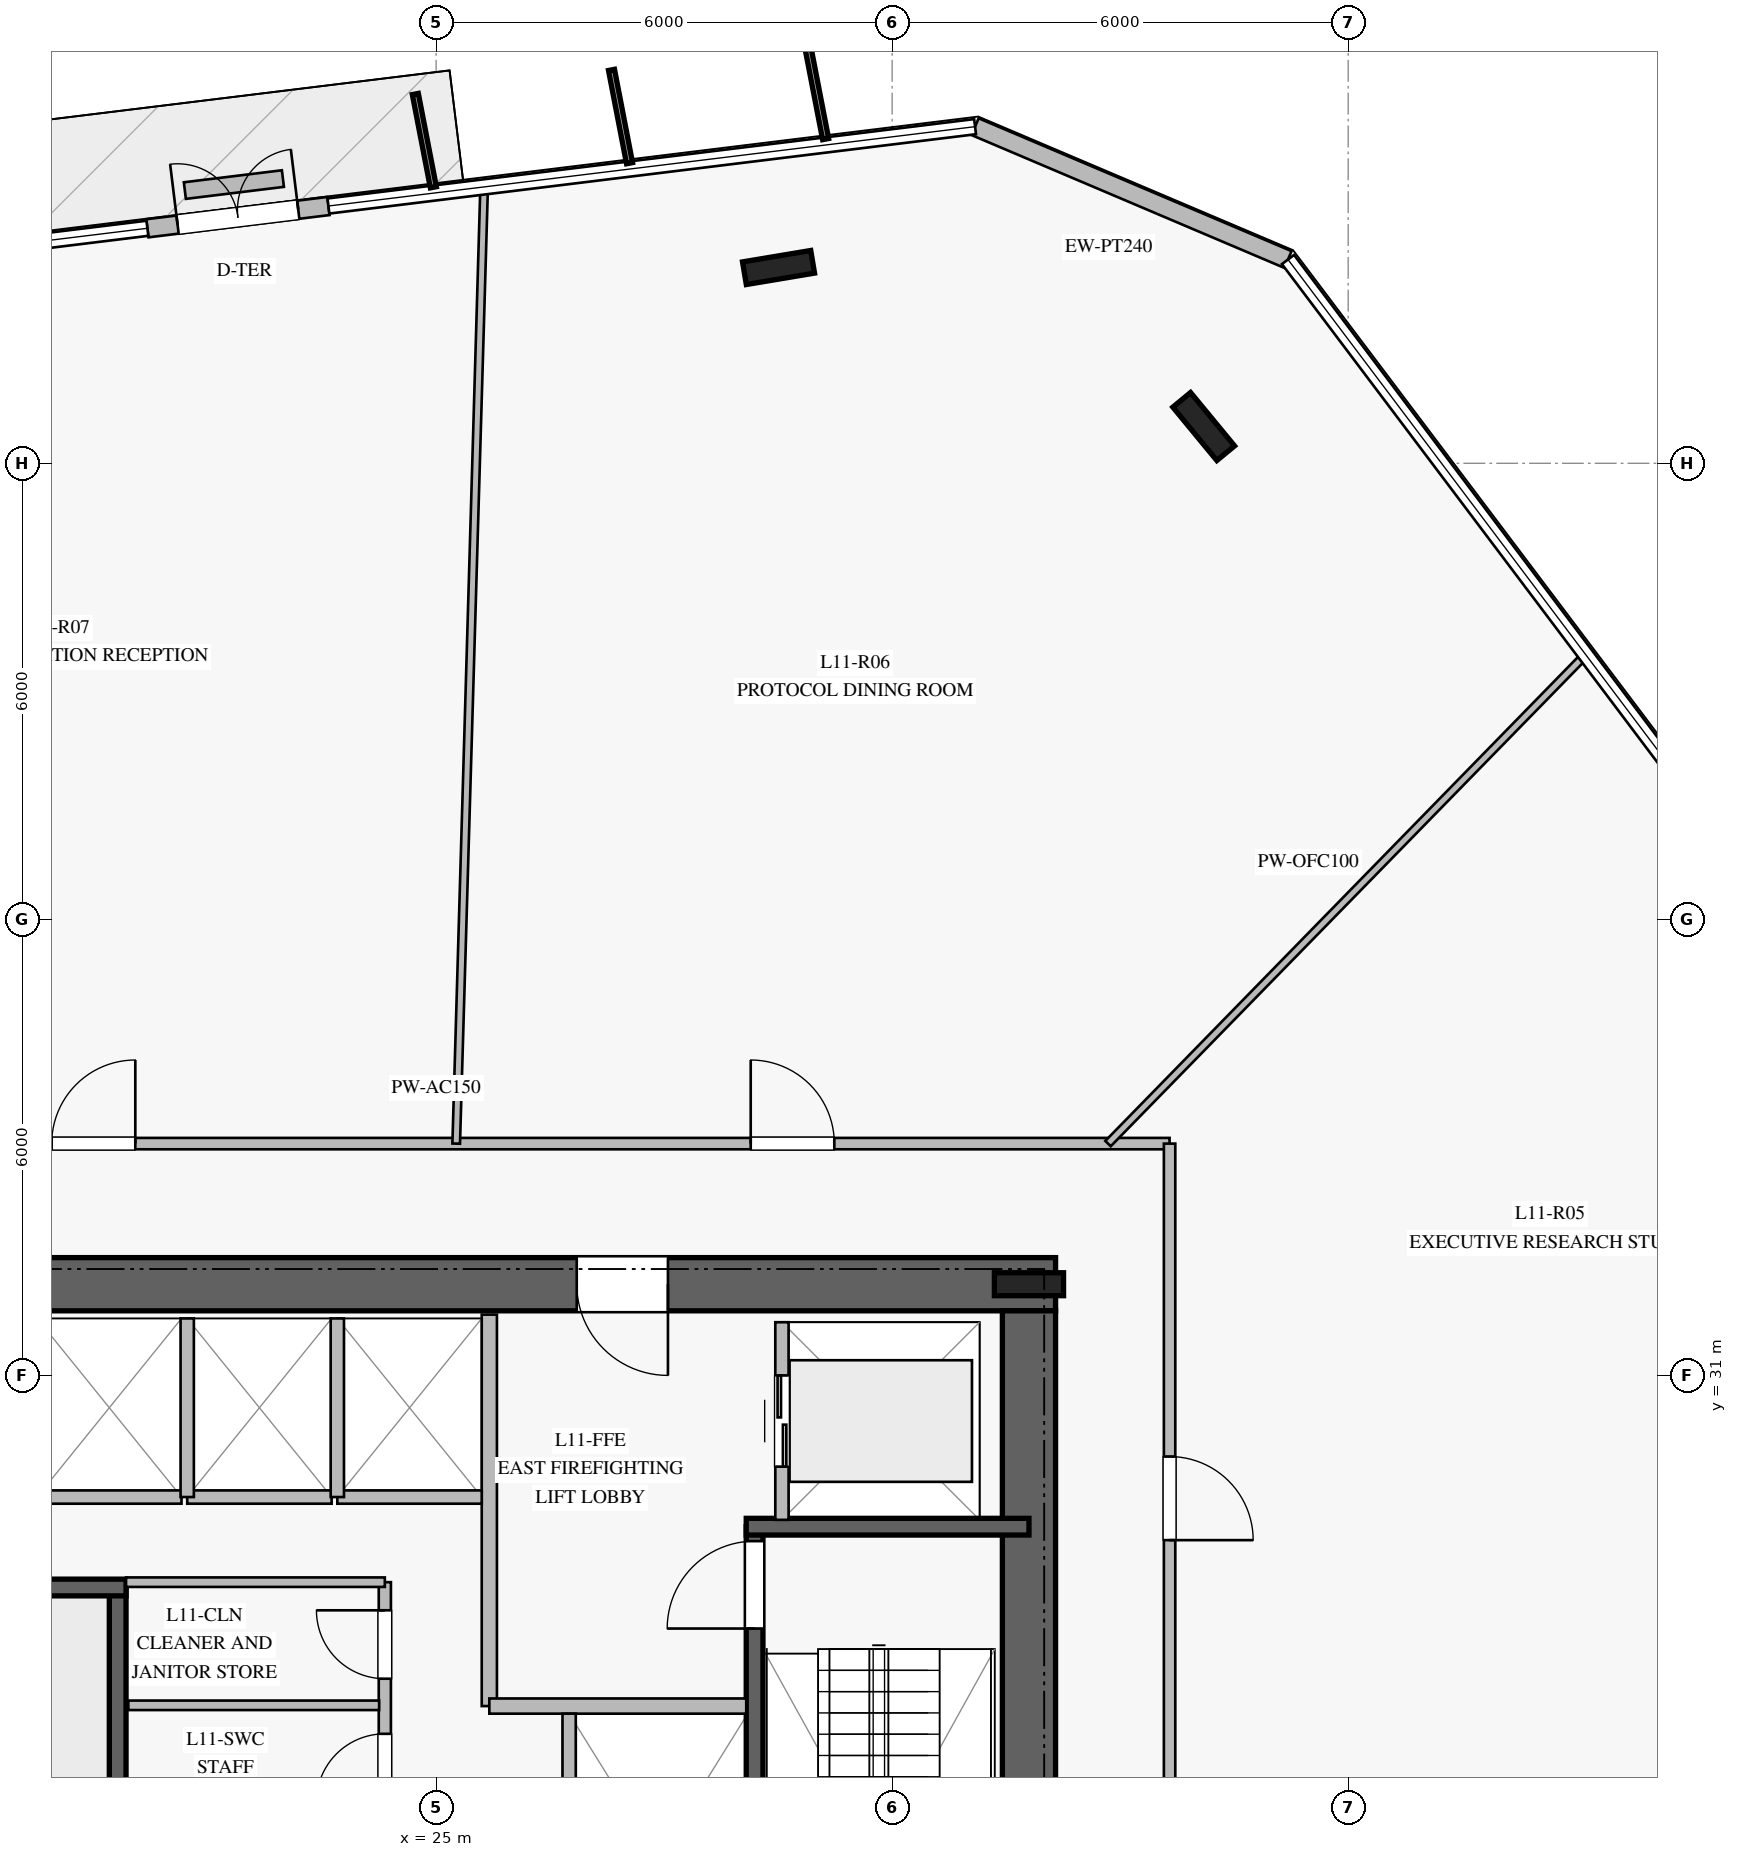
"""IFC4 building model, lengths in metres.
Left out: names, types, materials, properties, quantities, classifications, styles, units other than length and angle.
Written with IfcOpenShell. Run it as: python <this file> out.ifc"""

import sys

from ifc_helpers import new_model, si_unit, direction, frame, frame_2d, origin, origin_2d, place, context, subcontext, project, spatial, rectangle, i_section, extrude, element, fill, save


model = new_model("IFC4")
c1 = context("Model", 3, precision=1e-05, world=origin(), true_north=direction((0.0, 1.0)))
c2 = subcontext(c1, "Body", "Model", "MODEL_VIEW")
j1 = project(units=[si_unit("LENGTHUNIT", "METRE"), si_unit("PLANEANGLEUNIT", "RADIAN")], contexts=[c1])
p1 = place(None, origin())
s1 = spatial("IfcSite", under=j1, at=p1, CompositionType="ELEMENT")
p2 = place(p1, origin())
s2 = spatial("IfcBuilding", under=s1, at=p2, CompositionType="ELEMENT")
p3 = place(p2, frame((0.0, 0.0, 48.0)))
s3 = spatial("IfcBuildingStorey", under=s2, at=p3, CompositionType="ELEMENT", Elevation=48.0)
p4 = place(p3, frame((33.15, 32.2, 0.0), z_axis=(0.0, 0.0, 1.0), x_axis=(-1.0, 0.0, 0.0)))
e1 = element("IfcWall", 1, at=p4, inside=s3, PredefinedType="SHEAR", context=c2, shape_type="SweptSolid", body=[
    extrude(rectangle(XDim=16.3, YDim=0.7, at=frame_2d((8.15, 0.0))), origin(), (0.0, 0.0, 1.0), 3.76),
])
p5 = place(p4, frame((5.1, 0.0, 0.0)))
e2 = element("IfcOpeningElement", 2, at=p5, cuts=e1, PredefinedType="OPENING", context=c2, shape_type="SweptSolid", body=[
    extrude(rectangle(XDim=1.2, YDim=2.25, at=frame_2d((0.6, 1.125))), frame((0.0, 0.36, 0.0), z_axis=(0.0, -1.0, 0.0), x_axis=(1.0, 0.0, 0.0)), (0.0, 0.0, 1.0), 0.72),
])
p6 = place(p3, frame((32.8, 18.15, 0.0), z_axis=(0.0, 0.0, 1.0), x_axis=(0.0, 1.0, 0.0)))
e3 = element("IfcWall", 3, at=p6, inside=s3, PredefinedType="SHEAR", context=c2, shape_type="SweptSolid", body=[
    extrude(rectangle(XDim=13.7, YDim=0.7, at=frame_2d((6.85, 0.0))), origin(), (0.0, 0.0, 1.0), 3.76),
])
p7 = place(p3, frame((32.8, 32.2, 0.0), z_axis=(0.0, 0.0, 1.0), x_axis=(1.0, 0.0, 0.0)))
e4 = element("IfcColumn", 4, at=p7, inside=s3, PredefinedType="COLUMN", context=c2, shape_type="SweptSolid", body=[
    extrude(i_section(OverallWidth=0.302, OverallDepth=0.91, WebThickness=0.021, FlangeThickness=0.04, at=origin_2d()), origin(), (0.0, 0.0, 1.0), 4.0),
])
p8 = place(p3, frame((20.81, 20.99, 0.0), z_axis=(0.0, 0.0, 1.0), x_axis=(0.0, 1.0, 0.0)))
e5 = element("IfcWall", 5, at=p8, inside=s3, PredefinedType="SOLIDWALL", context=c2, shape_type="SweptSolid", body=[
    extrude(rectangle(XDim=7.22, YDim=0.22, at=frame_2d((3.61, 0.0))), origin(), (0.0, 0.0, 1.0), 3.76),
])
p9 = place(p8, frame((0.18, 0.0, 0.0)))
e6 = element("IfcOpeningElement", 6, at=p9, cuts=e5, PredefinedType="OPENING", context=c2, shape_type="SweptSolid", body=[
    extrude(rectangle(XDim=1.15, YDim=2.2, at=frame_2d((0.575, 1.1))), frame((0.0, 0.12, 0.0), z_axis=(0.0, -1.0, 0.0), x_axis=(1.0, 0.0, 0.0)), (0.0, 0.0, 1.0), 0.24),
])
p10 = place(p3, frame((17.2, 28.21, 0.0), z_axis=(0.0, 0.0, 1.0), x_axis=(1.0, 0.0, 0.0)))
e7 = element("IfcWall", 7, at=p10, inside=s3, PredefinedType="SOLIDWALL", context=c2, shape_type="SweptSolid", body=[
    extrude(rectangle(XDim=3.72, YDim=0.22, at=frame_2d((1.86, 0.0))), origin(), (0.0, 0.0, 1.0), 3.76),
])
p11 = place(p3, frame((29.19, 21.79, 0.0), z_axis=(0.0, 0.0, 1.0), x_axis=(0.0, 1.0, 0.0)))
e8 = element("IfcWall", 8, at=p11, inside=s3, PredefinedType="SOLIDWALL", context=c2, shape_type="SweptSolid", body=[
    extrude(rectangle(XDim=7.22, YDim=0.22, at=frame_2d((3.61, 0.0))), origin(), (0.0, 0.0, 1.0), 3.76),
])
p12 = place(p11, frame((5.88, 0.0, 0.0)))
e9 = element("IfcOpeningElement", 9, at=p12, cuts=e8, PredefinedType="OPENING", context=c2, shape_type="SweptSolid", body=[
    extrude(rectangle(XDim=1.15, YDim=2.2, at=frame_2d((0.575, 1.1))), frame((0.0, 0.12, 0.0), z_axis=(0.0, -1.0, 0.0), x_axis=(1.0, 0.0, 0.0)), (0.0, 0.0, 1.0), 0.24),
])
p13 = place(p3, frame((29.08, 29.01, 0.0), z_axis=(0.0, 0.0, 1.0), x_axis=(1.0, 0.0, 0.0)))
e10 = element("IfcWall", 10, at=p13, inside=s3, PredefinedType="SOLIDWALL", context=c2, shape_type="SweptSolid", body=[
    extrude(rectangle(XDim=3.72, YDim=0.22, at=frame_2d((1.86, 0.0))), origin(), (0.0, 0.0, 1.0), 3.76),
])
for number, where, z_axis, x_axis in (
    (11, (35.099, 43.484, 0.0), (0.0, 0.0, 1.0), (-0.636, 0.772, 0.0)),
    (12, (29.505, 45.576, 0.0), (0.0, 0.0, 1.0), (0.986, 0.165, 0.0)),
):
    element("IfcColumn", number, at=place(p3, frame(where, z_axis=z_axis, x_axis=x_axis)), inside=s3, PredefinedType="COLUMN", context=c2, shape_type="SweptSolid", body=[
        extrude(i_section(OverallWidth=0.302, OverallDepth=0.91, WebThickness=0.021, FlangeThickness=0.04, at=origin_2d()), origin(), (0.0, 0.0, 1.0), 4.0),
    ])
p14 = place(p3, frame((36.208, 45.681, 0.0), z_axis=(0.0, 0.0, 1.0), x_axis=(-0.920463989724, 0.390827383409, 0.0)))
e13 = element("IfcWall", 13, at=p14, inside=s3, PredefinedType="STANDARD", context=c2, shape_type="SweptSolid", body=[
    extrude(rectangle(XDim=4.473, YDim=0.24, at=frame_2d((2.236, 0.0))), origin(), (0.0, 0.0, 1.0), 3.76),
])
p15 = place(p3, frame((23.583, 46.385, 0.0), z_axis=(0.0, 0.0, 1.0), x_axis=(-0.992521632568, -0.122068869435, 0.0)))
e14 = element("IfcWall", 14, at=p15, inside=s3, PredefinedType="STANDARD", context=c2, shape_type="SweptSolid", body=[
    extrude(rectangle(XDim=2.4, YDim=0.24, at=frame_2d((1.2, 0.0))), origin(), (0.0, 0.0, 1.0), 3.76),
])
p16 = place(p15, frame((0.4, 0.0, 0.0)))
e15 = element("IfcOpeningElement", 15, at=p16, cuts=e14, PredefinedType="OPENING", context=c2, shape_type="SweptSolid", body=[
    extrude(rectangle(XDim=1.6, YDim=2.25, at=frame_2d((0.8, 1.125))), frame((0.0, 0.13, 0.0), z_axis=(0.0, -1.0, 0.0), x_axis=(1.0, 0.0, 0.0)), (0.0, 0.0, 1.0), 0.26),
])
p17 = place(p3, frame((22.984, 46.746, 0.0), z_axis=(0.0, 0.0, 1.0), x_axis=(-0.99256138924, -0.121745178919, 0.0)))
e16 = element("IfcWall", 16, at=p17, inside=s3, PredefinedType="USERDEFINED", context=c2, shape_type="SweptSolid", body=[
    extrude(rectangle(XDim=1.3, YDim=0.22, at=frame_2d((0.65, 0.0))), origin(), (0.0, 0.0, 1.0), 0.4),
])
p18 = place(p3, frame((25.7, 26.65, 0.0), z_axis=(0.0, 0.0, 1.0), x_axis=(0.0, 1.0, 0.0)))
e17 = element("IfcWall", 17, at=p18, inside=s3, PredefinedType="PARTITIONING", context=c2, shape_type="SweptSolid", body=[
    extrude(rectangle(XDim=5.15, YDim=0.2, at=frame_2d((2.575, 0.0))), origin(), (0.0, 0.0, 1.0), 3.76),
])
p19 = place(p3, frame((25.7, 26.65, 0.0), z_axis=(0.0, 0.0, 1.0), x_axis=(1.0, 0.0, 0.0)))
e18 = element("IfcWall", 18, at=p19, inside=s3, PredefinedType="PARTITIONING", context=c2, shape_type="SweptSolid", body=[
    extrude(rectangle(XDim=3.38, YDim=0.2, at=frame_2d((1.69, 0.0))), origin(), (0.0, 0.0, 1.0), 3.76),
])
p20 = place(p3, frame((24.325, 23.35, 0.0), z_axis=(0.0, 0.0, 1.0), x_axis=(0.0, 1.0, 0.0)))
e19 = element("IfcWall", 19, at=p20, inside=s3, PredefinedType="PLUMBINGWALL", context=c2, shape_type="SweptSolid", body=[
    extrude(rectangle(XDim=4.93, YDim=0.16, at=frame_2d((2.465, 0.0))), origin(), (0.0, 0.0, 1.0), 3.76),
])
p21 = place(p20, frame((0.375, 0.0, 0.0)))
e20 = element("IfcOpeningElement", 20, at=p21, cuts=e19, PredefinedType="OPENING", context=c2, shape_type="SweptSolid", body=[
    extrude(rectangle(XDim=0.95, YDim=2.1, at=frame_2d((0.475, 1.05))), frame((0.0, 0.09, 0.0), z_axis=(0.0, -1.0, 0.0), x_axis=(1.0, 0.0, 0.0)), (0.0, 0.0, 1.0), 0.18),
])
p22 = place(p20, frame((2.035, 0.0, 0.0)))
e21 = element("IfcOpeningElement", 21, at=p22, cuts=e19, PredefinedType="OPENING", context=c2, shape_type="SweptSolid", body=[
    extrude(rectangle(XDim=0.9, YDim=2.1, at=frame_2d((0.45, 1.05))), frame((0.0, 0.09, 0.0), z_axis=(0.0, -1.0, 0.0), x_axis=(1.0, 0.0, 0.0)), (0.0, 0.0, 1.0), 0.18),
])
p23 = place(p20, frame((3.66, 0.0, 0.0)))
e22 = element("IfcOpeningElement", 22, at=p23, cuts=e19, PredefinedType="OPENING", context=c2, shape_type="SweptSolid", body=[
    extrude(rectangle(XDim=0.9, YDim=2.1, at=frame_2d((0.45, 1.05))), frame((0.0, 0.09, 0.0), z_axis=(0.0, -1.0, 0.0), x_axis=(1.0, 0.0, 0.0)), (0.0, 0.0, 1.0), 0.18),
])
p24 = place(p3, frame((20.92, 28.28, 0.0), z_axis=(0.0, 0.0, 1.0), x_axis=(1.0, 0.0, 0.0)))
e23 = element("IfcWall", 23, at=p24, inside=s3, PredefinedType="PARTITIONING", context=c2, shape_type="SweptSolid", body=[
    extrude(rectangle(XDim=3.405, YDim=0.125, at=frame_2d((1.703, 0.0))), origin(), (0.0, 0.0, 1.0), 3.76),
])
p25 = place(p3, frame((20.95, 26.66, 0.0), z_axis=(0.0, 0.0, 1.0), x_axis=(1.0, 0.0, 0.0)))
e24 = element("IfcWall", 24, at=p25, inside=s3, PredefinedType="PARTITIONING", context=c2, shape_type="SweptSolid", body=[
    extrude(rectangle(XDim=3.3, YDim=0.125, at=frame_2d((1.65, 0.0))), origin(), (0.0, 0.0, 1.0), 3.76),
])
for number, where, z_axis, x_axis in (
    (25, (19.75, 29.4, 0.0), (0.0, 0.0, 1.0), (1.0, 0.0, 0.0)),
    (26, (21.725, 29.4, 0.0), (0.0, 0.0, 1.0), (1.0, 0.0, 0.0)),
):
    element("IfcWall", number, at=place(p3, frame(where, z_axis=z_axis, x_axis=x_axis)), inside=s3, PredefinedType="PARTITIONING", context=c2, shape_type="SweptSolid", body=[
        extrude(rectangle(XDim=1.9, YDim=0.175, at=frame_2d((0.95, 0.0))), origin(), (0.0, 0.0, 1.0), 3.76),
    ])
p26 = place(p3, frame((21.725, 29.4, 0.0), z_axis=(0.0, 0.0, 1.0), x_axis=(0.0, 1.0, 0.0)))
e27 = element("IfcWall", 27, at=p26, inside=s3, PredefinedType="PARTITIONING", context=c2, shape_type="SweptSolid", body=[
    extrude(rectangle(XDim=2.35, YDim=0.175, at=frame_2d((1.175, 0.0))), origin(), (0.0, 0.0, 1.0), 3.76),
])
p27 = place(p3, frame((23.7, 29.4, 0.0), z_axis=(0.0, 0.0, 1.0), x_axis=(1.0, 0.0, 0.0)))
e28 = element("IfcWall", 28, at=p27, inside=s3, PredefinedType="PARTITIONING", context=c2, shape_type="SweptSolid", body=[
    extrude(rectangle(XDim=1.9, YDim=0.175, at=frame_2d((0.95, 0.0))), origin(), (0.0, 0.0, 1.0), 3.76),
])
p28 = place(p3, frame((23.7, 29.4, 0.0), z_axis=(0.0, 0.0, 1.0), x_axis=(0.0, 1.0, 0.0)))
e29 = element("IfcWall", 29, at=p28, inside=s3, PredefinedType="PARTITIONING", context=c2, shape_type="SweptSolid", body=[
    extrude(rectangle(XDim=2.35, YDim=0.175, at=frame_2d((1.175, 0.0))), origin(), (0.0, 0.0, 1.0), 3.76),
])
p29 = place(p3, frame((26.75, 24.65, 0.0), z_axis=(0.0, 0.0, 1.0), x_axis=(0.0, 1.0, 0.0)))
e30 = element("IfcWall", 30, at=p29, inside=s3, PredefinedType="PARTITIONING", context=c2, shape_type="SweptSolid", body=[
    extrude(rectangle(XDim=1.9, YDim=0.175, at=frame_2d((0.95, 0.0))), origin(), (0.0, 0.0, 1.0), 3.76),
])
p30 = place(p3, frame((29.55, 29.1, 0.0), z_axis=(0.0, 0.0, 1.0), x_axis=(0.0, 1.0, 0.0)))
e31 = element("IfcWall", 31, at=p30, inside=s3, PredefinedType="PARTITIONING", context=c2, shape_type="SweptSolid", body=[
    extrude(rectangle(XDim=2.6, YDim=0.175, at=frame_2d((1.3, 0.0))), origin(), (0.0, 0.0, 1.0), 3.76),
])
p31 = place(p30, frame((0.7, 0.0, 0.0)))
e32 = element("IfcOpeningElement", 32, at=p31, cuts=e31, PredefinedType="OPENING", context=c2, shape_type="SweptSolid", body=[
    extrude(rectangle(XDim=1.2, YDim=2.2, at=frame_2d((0.6, 1.1))), frame((0.0, 0.098, 0.0), z_axis=(0.0, -1.0, 0.0), x_axis=(1.0, 0.0, 0.0)), (0.0, 0.0, 1.0), 0.195),
])
p32 = place(p3, frame((15.35, 34.05, 0.0), z_axis=(0.0, 0.0, 1.0), x_axis=(1.0, 0.0, 0.0)))
e33 = element("IfcWall", 33, at=p32, inside=s3, PredefinedType="PARTITIONING", context=c2, shape_type="SweptSolid", body=[
    extrude(rectangle(XDim=19.3, YDim=0.15, at=frame_2d((9.65, 0.0))), origin(), (0.0, 0.0, 1.0), 3.21),
])
p33 = place(p32, frame((13.789, 0.0, 0.0)))
e34 = element("IfcOpeningElement", 34, at=p33, cuts=e33, PredefinedType="OPENING", context=c2, shape_type="SweptSolid", body=[
    extrude(rectangle(XDim=1.1, YDim=2.2, at=frame_2d((0.55, 1.1))), frame((0.0, 0.085, 0.0), z_axis=(0.0, -1.0, 0.0), x_axis=(1.0, 0.0, 0.0)), (0.0, 0.0, 1.0), 0.17),
])
p34 = place(p32, frame((4.592, 0.0, 0.0)))
e35 = element("IfcOpeningElement", 35, at=p34, cuts=e33, PredefinedType="OPENING", context=c2, shape_type="SweptSolid", body=[
    extrude(rectangle(XDim=1.1, YDim=2.2, at=frame_2d((0.55, 1.1))), frame((0.0, 0.085, 0.0), z_axis=(0.0, -1.0, 0.0), x_axis=(1.0, 0.0, 0.0)), (0.0, 0.0, 1.0), 0.17),
])
p35 = place(p3, frame((34.65, 34.05, 0.0), z_axis=(0.0, 0.0, 1.0), x_axis=(0.0, -1.0, 0.0)))
e36 = element("IfcWall", 36, at=p35, inside=s3, PredefinedType="PARTITIONING", context=c2, shape_type="SweptSolid", body=[
    extrude(rectangle(XDim=18.1, YDim=0.15, at=frame_2d((9.05, 0.0))), origin(), (0.0, 0.0, 1.0), 3.21),
])
p36 = place(p35, frame((12.71, 0.0, 0.0)))
e37 = element("IfcOpeningElement", 37, at=p36, cuts=e36, PredefinedType="OPENING", context=c2, shape_type="SweptSolid", body=[
    extrude(rectangle(XDim=1.1, YDim=2.2, at=frame_2d((0.55, 1.1))), frame((0.0, 0.085, 0.0), z_axis=(0.0, -1.0, 0.0), x_axis=(1.0, 0.0, 0.0)), (0.0, 0.0, 1.0), 0.17),
])
p37 = place(p35, frame((4.117, 0.0, 0.0)))
e38 = element("IfcOpeningElement", 38, at=p37, cuts=e36, PredefinedType="OPENING", context=c2, shape_type="SweptSolid", body=[
    extrude(rectangle(XDim=1.1, YDim=2.2, at=frame_2d((0.55, 1.1))), frame((0.0, 0.085, 0.0), z_axis=(0.0, -1.0, 0.0), x_axis=(1.0, 0.0, 0.0)), (0.0, 0.0, 1.0), 0.17),
])
p38 = place(p3, frame((33.84, 34.05, 0.0), z_axis=(0.0, 0.0, 1.0), x_axis=(0.698762183729, 0.715354045624, 0.0)))
e39 = element("IfcWall", 39, at=p38, inside=s3, PredefinedType="MOVABLE", context=c2, shape_type="SweptSolid", body=[
    extrude(rectangle(XDim=8.976, YDim=0.1, at=frame_2d((4.488, 0.0))), origin(), (0.0, 0.0, 1.0), 3.02),
])
p39 = place(p3, frame((25.264, 34.05, 0.0), z_axis=(0.0, 0.0, 1.0), x_axis=(0.029203902764, 0.99957347507, 0.0)))
e40 = element("IfcWall", 40, at=p39, inside=s3, PredefinedType="MOVABLE", context=c2, shape_type="SweptSolid", body=[
    extrude(rectangle(XDim=12.573, YDim=0.1, at=frame_2d((6.287, 0.0))), origin(), (0.0, 0.0, 1.0), 3.05),
])
p40 = place(p16, frame((1.6, 0.0, 0.0), z_axis=(0.0, 0.0, 1.0), x_axis=(-1.0, 0.0, 0.0)))
e41 = element("IfcDoor", 41, at=p40, inside=s3, OperationType="DOUBLE_DOOR_SINGLE_SWING", PredefinedType="DOOR", context=c2, shape_type="SweptSolid", body=[
    extrude(rectangle(XDim=1.6, YDim=2.25, at=frame_2d((0.8, 1.125))), frame((0.0, 0.025, 0.0), z_axis=(0.0, -1.0, 0.0), x_axis=(1.0, 0.0, 0.0)), (0.0, 0.0, 1.0), 0.05),
])
fill(e15, e41)
p41 = place(p12, origin())
e42 = element("IfcDoor", 42, at=p41, inside=s3, OperationType="SINGLE_SWING_LEFT", PredefinedType="DOOR", context=c2, shape_type="SweptSolid", body=[
    extrude(rectangle(XDim=1.15, YDim=2.2, at=frame_2d((0.575, 1.1))), frame((0.0, 0.025, 0.0), z_axis=(0.0, -1.0, 0.0), x_axis=(1.0, 0.0, 0.0)), (0.0, 0.0, 1.0), 0.05),
])
fill(e9, e42)
p42 = place(p5, origin())
e43 = element("IfcDoor", 43, at=p42, inside=s3, OperationType="SINGLE_SWING_LEFT", PredefinedType="DOOR", context=c2, shape_type="SweptSolid", body=[
    extrude(rectangle(XDim=1.2, YDim=2.25, at=frame_2d((0.6, 1.125))), frame((0.0, 0.025, 0.0), z_axis=(0.0, -1.0, 0.0), x_axis=(1.0, 0.0, 0.0)), (0.0, 0.0, 1.0), 0.05),
])
fill(e2, e43)
p43 = place(p22, origin())
e44 = element("IfcDoor", 44, at=p43, inside=s3, OperationType="SINGLE_SWING_LEFT", PredefinedType="DOOR", context=c2, shape_type="SweptSolid", body=[
    extrude(rectangle(XDim=0.9, YDim=2.1, at=frame_2d((0.45, 1.05))), frame((0.0, 0.025, 0.0), z_axis=(0.0, -1.0, 0.0), x_axis=(1.0, 0.0, 0.0)), (0.0, 0.0, 1.0), 0.05),
])
fill(e21, e44)
p44 = place(p23, origin())
e45 = element("IfcDoor", 45, at=p44, inside=s3, OperationType="SINGLE_SWING_RIGHT", PredefinedType="DOOR", context=c2, shape_type="SweptSolid", body=[
    extrude(rectangle(XDim=0.9, YDim=2.1, at=frame_2d((0.45, 1.05))), frame((0.0, 0.025, 0.0), z_axis=(0.0, -1.0, 0.0), x_axis=(1.0, 0.0, 0.0)), (0.0, 0.0, 1.0), 0.05),
])
fill(e22, e45)
p45 = place(p31, origin())
e46 = element("IfcDoor", 46, at=p45, inside=s3, OperationType="DOUBLE_DOOR_SLIDING", PredefinedType="DOOR", context=c2, shape_type="SweptSolid", body=[
    extrude(rectangle(XDim=1.2, YDim=2.2, at=frame_2d((0.6, 1.1))), frame((0.0, 0.025, 0.0), z_axis=(0.0, -1.0, 0.0), x_axis=(1.0, 0.0, 0.0)), (0.0, 0.0, 1.0), 0.05),
])
fill(e32, e46)
p46 = place(p37, origin())
e47 = element("IfcDoor", 47, at=p46, inside=s3, OperationType="SINGLE_SWING_RIGHT", PredefinedType="DOOR", context=c2, shape_type="SweptSolid", body=[
    extrude(rectangle(XDim=1.1, YDim=2.2, at=frame_2d((0.55, 1.1))), frame((0.0, 0.025, 0.0), z_axis=(0.0, -1.0, 0.0), x_axis=(1.0, 0.0, 0.0)), (0.0, 0.0, 1.0), 0.05),
])
fill(e38, e47)
p47 = place(p33, origin())
e48 = element("IfcDoor", 48, at=p47, inside=s3, OperationType="SINGLE_SWING_LEFT", PredefinedType="DOOR", context=c2, shape_type="SweptSolid", body=[
    extrude(rectangle(XDim=1.1, YDim=2.2, at=frame_2d((0.55, 1.1))), frame((0.0, 0.025, 0.0), z_axis=(0.0, -1.0, 0.0), x_axis=(1.0, 0.0, 0.0)), (0.0, 0.0, 1.0), 0.05),
])
fill(e34, e48)
p48 = place(p34, origin())
e49 = element("IfcDoor", 49, at=p48, inside=s3, OperationType="SINGLE_SWING_RIGHT", PredefinedType="DOOR", context=c2, shape_type="SweptSolid", body=[
    extrude(rectangle(XDim=1.1, YDim=2.2, at=frame_2d((0.55, 1.1))), frame((0.0, 0.025, 0.0), z_axis=(0.0, -1.0, 0.0), x_axis=(1.0, 0.0, 0.0)), (0.0, 0.0, 1.0), 0.05),
])
fill(e35, e49)
save(model, sys.argv[1])
